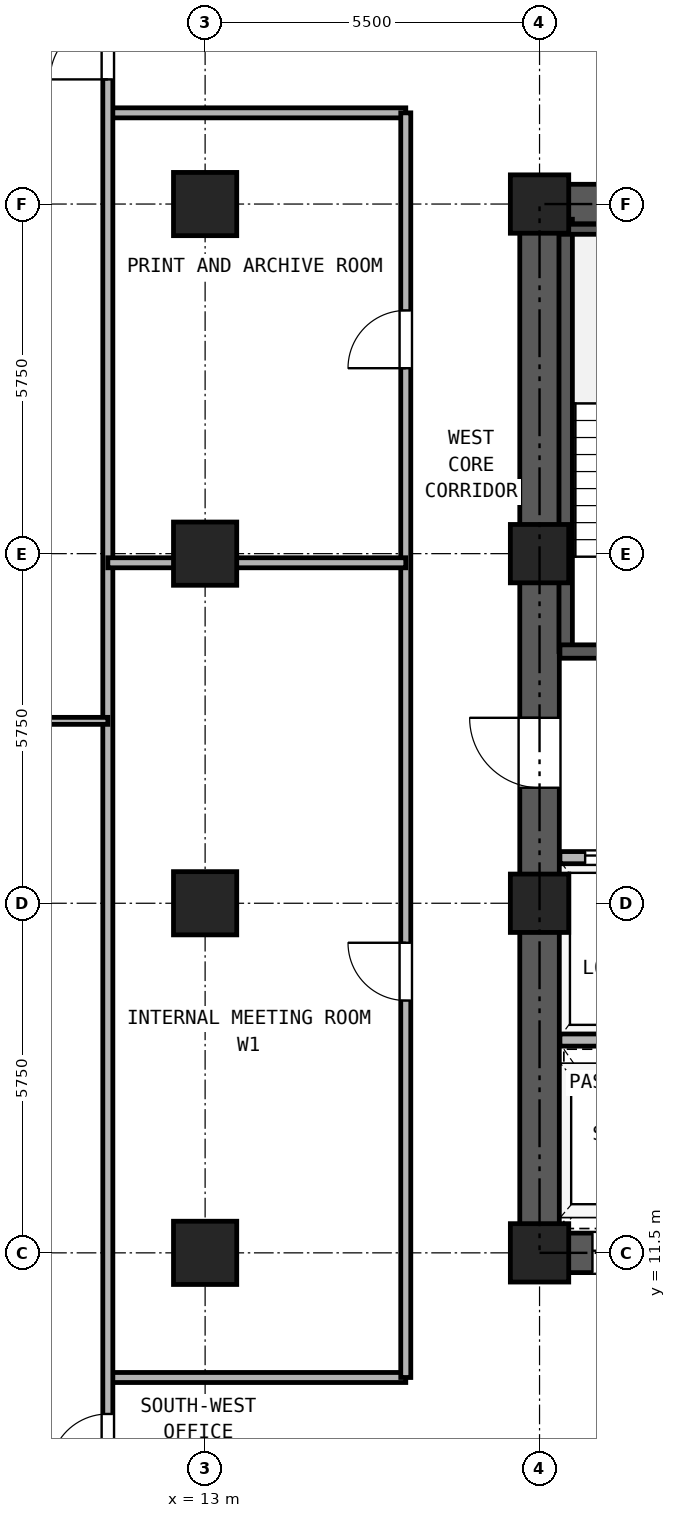
"""IFC4 building model, lengths in metres.
Left out: names, types, materials, properties, quantities, classifications, styles, units other than length and angle.
Written with IfcOpenShell. Run it as: python <this file> out.ifc"""

import sys

from ifc_helpers import new_model, si_unit, direction, frame, frame_2d, origin, origin_2d, place, context, subcontext, project, spatial, rectangle, hollow_rectangle, extrude, source, transform, mapped, element, fill, save


model = new_model("IFC4")
c1 = context("Model", 3, precision=1e-05, world=origin(), true_north=direction((0.0, 1.0)))
c2 = subcontext(c1, "Body", "Model", "MODEL_VIEW")
j1 = project(units=[si_unit("LENGTHUNIT", "METRE"), si_unit("PLANEANGLEUNIT", "RADIAN")], contexts=[c1])
p1 = place(None, origin())
s1 = spatial("IfcSite", under=j1, at=p1, CompositionType="ELEMENT")
p2 = place(p1, origin())
s2 = spatial("IfcBuilding", under=s1, at=p2, CompositionType="ELEMENT")
p3 = place(p2, frame((0.0, 0.0, 29.7)))
s3 = spatial("IfcBuildingStorey", under=s2, at=p3, CompositionType="ELEMENT", Elevation=29.7)
m1 = source(origin(), c2, "Body", "SweptSolid", [
    extrude(hollow_rectangle(XDim=1.04, YDim=1.04, WallThickness=0.065, at=origin_2d()), origin(), (0.0, 0.0, 1.0), 3.32),
])
for number, where, z_axis, x_axis in (
    (1, (13.0, 11.5, 0.0), (0.0, 0.0, 1.0), (1.0, 0.0, 0.0)),
    (2, (13.0, 17.25, 0.0), (0.0, 0.0, 1.0), (1.0, 0.0, 0.0)),
    (3, (13.0, 23.0, 0.0), (0.0, 0.0, 1.0), (1.0, 0.0, 0.0)),
    (4, (13.0, 28.75, 0.0), (0.0, 0.0, 1.0), (1.0, 0.0, 0.0)),
):
    element("IfcColumn", number, at=place(p3, frame(where, z_axis=z_axis, x_axis=x_axis)), inside=s3, PredefinedType="COLUMN", context=c2, shape_type="MappedRepresentation", body=[
        mapped(m1, transform((0.0, 0.0, 0.0), x_axis=(1.0, 0.0, 0.0), y_axis=(0.0, 1.0, 0.0), z_axis=(0.0, 0.0, 1.0), scale=1.0)),
    ])
m2 = source(origin(), c2, "Body", "SweptSolid", [
    extrude(hollow_rectangle(XDim=0.96, YDim=0.96, WallThickness=0.06, at=origin_2d()), origin(), (0.0, 0.0, 1.0), 3.32),
])
for number, where, z_axis, x_axis in (
    (5, (18.5, 11.5, 0.0), (0.0, 0.0, 1.0), (1.0, 0.0, 0.0)),
    (6, (18.5, 17.25, 0.0), (0.0, 0.0, 1.0), (1.0, 0.0, 0.0)),
    (7, (18.5, 23.0, 0.0), (0.0, 0.0, 1.0), (1.0, 0.0, 0.0)),
    (8, (18.5, 28.75, 0.0), (0.0, 0.0, 1.0), (1.0, 0.0, 0.0)),
):
    element("IfcColumn", number, at=place(p3, frame(where, z_axis=z_axis, x_axis=x_axis)), inside=s3, PredefinedType="COLUMN", context=c2, shape_type="MappedRepresentation", body=[
        mapped(m2, transform((0.0, 0.0, 0.0), x_axis=(1.0, 0.0, 0.0), y_axis=(0.0, 1.0, 0.0), z_axis=(0.0, 0.0, 1.0), scale=1.0)),
    ])
p4 = place(p3, frame((18.175, 11.5, 0.0), z_axis=(0.0, 0.0, 1.0), x_axis=(1.0, 0.0, 0.0)))
e9 = element("IfcWall", 9, at=p4, inside=s3, PredefinedType="SHEAR", context=c2, shape_type="SweptSolid", body=[
    extrude(rectangle(XDim=10.65, YDim=0.65, at=frame_2d((5.325, 0.0))), origin(), (0.0, 0.0, 1.0), 3.32),
])
p5 = place(p4, frame((1.195, 0.0, 0.0)))
e10 = element("IfcOpeningElement", 10, at=p5, cuts=e9, PredefinedType="OPENING", context=c2, shape_type="SweptSolid", body=[
    extrude(rectangle(XDim=1.1, YDim=2.25, at=frame_2d((0.55, 1.125))), frame((0.0, 0.335, 0.0), z_axis=(0.0, -1.0, 0.0), x_axis=(1.0, 0.0, 0.0)), (0.0, 0.0, 1.0), 0.67),
])
p6 = place(p4, frame((3.495, 0.0, 0.0)))
e11 = element("IfcOpeningElement", 11, at=p6, cuts=e9, PredefinedType="OPENING", context=c2, shape_type="SweptSolid", body=[
    extrude(rectangle(XDim=1.1, YDim=2.25, at=frame_2d((0.55, 1.125))), frame((0.0, 0.335, 0.0), z_axis=(0.0, -1.0, 0.0), x_axis=(1.0, 0.0, 0.0)), (0.0, 0.0, 1.0), 0.67),
])
p7 = place(p4, frame((5.925, 0.0, 0.0)))
e12 = element("IfcOpeningElement", 12, at=p7, cuts=e9, PredefinedType="OPENING", context=c2, shape_type="SweptSolid", body=[
    extrude(rectangle(XDim=1.1, YDim=2.25, at=frame_2d((0.55, 1.125))), frame((0.0, 0.335, 0.0), z_axis=(0.0, -1.0, 0.0), x_axis=(1.0, 0.0, 0.0)), (0.0, 0.0, 1.0), 0.67),
])
p8 = place(p4, frame((8.325, 0.0, 0.0)))
e13 = element("IfcOpeningElement", 13, at=p8, cuts=e9, PredefinedType="OPENING", context=c2, shape_type="SweptSolid", body=[
    extrude(rectangle(XDim=1.1, YDim=2.25, at=frame_2d((0.55, 1.125))), frame((0.0, 0.335, 0.0), z_axis=(0.0, -1.0, 0.0), x_axis=(1.0, 0.0, 0.0)), (0.0, 0.0, 1.0), 0.67),
])
p9 = place(p3, frame((18.175, 28.75, 0.0), z_axis=(0.0, 0.0, 1.0), x_axis=(1.0, 0.0, 0.0)))
e14 = element("IfcWall", 14, at=p9, inside=s3, PredefinedType="SHEAR", context=c2, shape_type="SweptSolid", body=[
    extrude(rectangle(XDim=10.65, YDim=0.65, at=frame_2d((5.325, 0.0))), origin(), (0.0, 0.0, 1.0), 3.32),
])
p10 = place(p9, frame((4.205, 0.0, 0.0)))
e15 = element("IfcOpeningElement", 15, at=p10, cuts=e14, PredefinedType="OPENING", context=c2, shape_type="SweptSolid", body=[
    extrude(rectangle(XDim=0.9, YDim=2.05, at=frame_2d((0.45, 1.025))), frame((0.0, 0.335, 0.0), z_axis=(0.0, -1.0, 0.0), x_axis=(1.0, 0.0, 0.0)), (0.0, 0.0, 1.0), 0.67),
])
p11 = place(p9, frame((5.745, 0.0, 0.0)))
e16 = element("IfcOpeningElement", 16, at=p11, cuts=e14, PredefinedType="OPENING", context=c2, shape_type="SweptSolid", body=[
    extrude(rectangle(XDim=0.9, YDim=2.05, at=frame_2d((0.45, 1.025))), frame((0.0, 0.335, 0.0), z_axis=(0.0, -1.0, 0.0), x_axis=(1.0, 0.0, 0.0)), (0.0, 0.0, 1.0), 0.67),
])
p12 = place(p3, frame((18.5, 11.825, 0.0), z_axis=(0.0, 0.0, 1.0), x_axis=(0.0, 1.0, 0.0)))
e17 = element("IfcWall", 17, at=p12, inside=s3, PredefinedType="SHEAR", context=c2, shape_type="SweptSolid", body=[
    extrude(rectangle(XDim=16.6, YDim=0.65, at=frame_2d((8.3, 0.0))), origin(), (0.0, 0.0, 1.0), 3.32),
])
p13 = place(p12, frame((7.325, 0.0, 0.0)))
e18 = element("IfcOpeningElement", 18, at=p13, cuts=e17, PredefinedType="OPENING", context=c2, shape_type="SweptSolid", body=[
    extrude(rectangle(XDim=1.15, YDim=2.2, at=frame_2d((0.575, 1.1))), frame((0.0, 0.335, 0.0), z_axis=(0.0, -1.0, 0.0), x_axis=(1.0, 0.0, 0.0)), (0.0, 0.0, 1.0), 0.67),
])
p14 = place(p3, frame((18.93, 21.39, 0.0), z_axis=(0.0, 0.0, 1.0), x_axis=(0.0, 1.0, 0.0)))
e19 = element("IfcWall", 19, at=p14, inside=s3, PredefinedType="SOLIDWALL", context=c2, shape_type="SweptSolid", body=[
    extrude(rectangle(XDim=7.11, YDim=0.22, at=frame_2d((3.555, 0.0))), origin(), (0.0, 0.0, 1.0), 3.32),
])
p15 = place(p3, frame((18.835, 28.335, 0.0), z_axis=(0.0, 0.0, 1.0), x_axis=(1.0, 0.0, 0.0)))
e20 = element("IfcWall", 20, at=p15, inside=s3, PredefinedType="PARTITIONING", context=c2, shape_type="SweptSolid", body=[
    extrude(rectangle(XDim=3.275, YDim=0.165, at=frame_2d((1.638, 0.0))), origin(), (0.0, 0.0, 1.0), 3.32),
])
p16 = place(p3, frame((18.835, 21.39, 0.0), z_axis=(0.0, 0.0, 1.0), x_axis=(1.0, 0.0, 0.0)))
e21 = element("IfcWall", 21, at=p16, inside=s3, PredefinedType="SOLIDWALL", context=c2, shape_type="SweptSolid", body=[
    extrude(rectangle(XDim=6.295, YDim=0.22, at=frame_2d((3.147, 0.0))), origin(), (0.0, 0.0, 1.0), 3.32),
])
p17 = place(p16, frame((1.015, 0.0, 0.0)))
e22 = element("IfcOpeningElement", 22, at=p17, cuts=e21, PredefinedType="OPENING", context=c2, shape_type="SweptSolid", body=[
    extrude(rectangle(XDim=1.15, YDim=2.2, at=frame_2d((0.575, 1.1))), frame((0.0, 0.12, 0.0), z_axis=(0.0, -1.0, 0.0), x_axis=(1.0, 0.0, 0.0)), (0.0, 0.0, 1.0), 0.24),
])
p18 = place(p16, frame((4.745, 0.0, 0.0)))
e23 = element("IfcOpeningElement", 23, at=p18, cuts=e21, PredefinedType="OPENING", context=c2, shape_type="SweptSolid", body=[
    extrude(rectangle(XDim=1.1, YDim=2.25, at=frame_2d((0.55, 1.125))), frame((0.0, 0.12, 0.0), z_axis=(0.0, -1.0, 0.0), x_axis=(1.0, 0.0, 0.0)), (0.0, 0.0, 1.0), 0.24),
])
p19 = place(p3, frame((18.835, 18.0, 0.0), z_axis=(0.0, 0.0, 1.0), x_axis=(1.0, 0.0, 0.0)))
e24 = element("IfcWall", 24, at=p19, inside=s3, PredefinedType="PARTITIONING", context=c2, shape_type="SweptSolid", body=[
    extrude(rectangle(XDim=9.33, YDim=0.2, at=frame_2d((4.665, 0.0))), origin(), (0.0, 0.0, 1.0), 3.32),
])
p20 = place(p19, frame((0.415, 0.0, 0.0)))
e25 = element("IfcOpeningElement", 25, at=p20, cuts=e24, PredefinedType="OPENING", context=c2, shape_type="SweptSolid", body=[
    extrude(rectangle(XDim=1.3, YDim=2.3, at=frame_2d((0.65, 1.15))), frame((0.0, 0.11, 0.0), z_axis=(0.0, -1.0, 0.0), x_axis=(1.0, 0.0, 0.0)), (0.0, 0.0, 1.0), 0.22),
])
p21 = place(p19, frame((2.515, 0.0, 0.0)))
e26 = element("IfcOpeningElement", 26, at=p21, cuts=e24, PredefinedType="OPENING", context=c2, shape_type="SweptSolid", body=[
    extrude(rectangle(XDim=1.3, YDim=2.3, at=frame_2d((0.65, 1.15))), frame((0.0, 0.11, 0.0), z_axis=(0.0, -1.0, 0.0), x_axis=(1.0, 0.0, 0.0)), (0.0, 0.0, 1.0), 0.22),
])
p22 = place(p19, frame((4.915, 0.0, 0.0)))
e27 = element("IfcOpeningElement", 27, at=p22, cuts=e24, PredefinedType="OPENING", context=c2, shape_type="SweptSolid", body=[
    extrude(rectangle(XDim=0.9, YDim=2.05, at=frame_2d((0.45, 1.025))), frame((0.0, 0.11, 0.0), z_axis=(0.0, -1.0, 0.0), x_axis=(1.0, 0.0, 0.0)), (0.0, 0.0, 1.0), 0.22),
])
p23 = place(p19, frame((7.615, 0.0, 0.0)))
e28 = element("IfcOpeningElement", 28, at=p23, cuts=e24, PredefinedType="OPENING", context=c2, shape_type="SweptSolid", body=[
    extrude(rectangle(XDim=0.9, YDim=2.05, at=frame_2d((0.45, 1.025))), frame((0.0, 0.11, 0.0), z_axis=(0.0, -1.0, 0.0), x_axis=(1.0, 0.0, 0.0)), (0.0, 0.0, 1.0), 0.22),
])
p24 = place(p3, frame((18.835, 15.0, 0.0), z_axis=(0.0, 0.0, 1.0), x_axis=(1.0, 0.0, 0.0)))
e29 = element("IfcWall", 29, at=p24, inside=s3, PredefinedType="PARTITIONING", context=c2, shape_type="SweptSolid", body=[
    extrude(rectangle(XDim=9.33, YDim=0.2, at=frame_2d((4.665, 0.0))), origin(), (0.0, 0.0, 1.0), 3.32),
])
for number, where, z_axis, x_axis in (
    (30, (11.4, 9.45, 0.0), (0.0, 0.0, 1.0), (1.0, 0.0, 0.0)),
    (31, (11.4, 30.25, 0.0), (0.0, 0.0, 1.0), (1.0, 0.0, 0.0)),
):
    element("IfcWall", number, at=place(p3, frame(where, z_axis=z_axis, x_axis=x_axis)), inside=s3, PredefinedType="PARTITIONING", context=c2, shape_type="SweptSolid", body=[
        extrude(rectangle(XDim=4.9, YDim=0.165, at=frame_2d((2.45, 0.0))), origin(), (0.0, 0.0, 1.0), 3.32),
    ])
p25 = place(p3, frame((16.3, 9.45, 0.0), z_axis=(0.0, 0.0, 1.0), x_axis=(0.0, 1.0, 0.0)))
e32 = element("IfcWall", 32, at=p25, inside=s3, PredefinedType="PARTITIONING", context=c2, shape_type="SweptSolid", body=[
    extrude(rectangle(XDim=20.8, YDim=0.165, at=frame_2d((10.4, 0.0))), origin(), (0.0, 0.0, 1.0), 3.32),
])
p26 = place(p25, frame((6.2, 0.0, 0.0)))
e33 = element("IfcOpeningElement", 33, at=p26, cuts=e32, PredefinedType="OPENING", context=c2, shape_type="SweptSolid", body=[
    extrude(rectangle(XDim=0.95, YDim=2.15, at=frame_2d((0.475, 1.075))), frame((0.0, 0.093, 0.0), z_axis=(0.0, -1.0, 0.0), x_axis=(1.0, 0.0, 0.0)), (0.0, 0.0, 1.0), 0.185),
])
p27 = place(p25, frame((16.6, 0.0, 0.0)))
e34 = element("IfcOpeningElement", 34, at=p27, cuts=e32, PredefinedType="OPENING", context=c2, shape_type="SweptSolid", body=[
    extrude(rectangle(XDim=0.95, YDim=2.15, at=frame_2d((0.475, 1.075))), frame((0.0, 0.093, 0.0), z_axis=(0.0, -1.0, 0.0), x_axis=(1.0, 0.0, 0.0)), (0.0, 0.0, 1.0), 0.185),
])
p28 = place(p3, frame((11.4, 0.16, 0.0), z_axis=(0.0, 0.0, 1.0), x_axis=(0.0, 1.0, 0.0)))
e35 = element("IfcWall", 35, at=p28, inside=s3, PredefinedType="PARTITIONING", context=c2, shape_type="SweptSolid", body=[
    extrude(rectangle(XDim=40.18, YDim=0.165, at=frame_2d((20.09, 0.0))), origin(), (0.0, 0.0, 1.0), 3.32),
])
p29 = place(p28, frame((7.74, 0.0, 0.0)))
e36 = element("IfcOpeningElement", 36, at=p29, cuts=e35, PredefinedType="OPENING", context=c2, shape_type="SweptSolid", body=[
    extrude(rectangle(XDim=0.95, YDim=2.15, at=frame_2d((0.475, 1.075))), frame((0.0, 0.093, 0.0), z_axis=(0.0, -1.0, 0.0), x_axis=(1.0, 0.0, 0.0)), (0.0, 0.0, 1.0), 0.185),
])
p30 = place(p28, frame((30.64, 0.0, 0.0)))
e37 = element("IfcOpeningElement", 37, at=p30, cuts=e35, PredefinedType="OPENING", context=c2, shape_type="SweptSolid", body=[
    extrude(rectangle(XDim=0.95, YDim=2.15, at=frame_2d((0.475, 1.075))), frame((0.0, 0.093, 0.0), z_axis=(0.0, -1.0, 0.0), x_axis=(1.0, 0.0, 0.0)), (0.0, 0.0, 1.0), 0.185),
])
p31 = place(p3, frame((0.16, 20.25, 0.0), z_axis=(0.0, 0.0, 1.0), x_axis=(1.0, 0.0, 0.0)))
e38 = element("IfcWall", 38, at=p31, inside=s3, PredefinedType="PARTITIONING", context=c2, shape_type="SweptSolid", body=[
    extrude(rectangle(XDim=11.24, YDim=0.115, at=frame_2d((5.62, 0.0))), origin(), (0.0, 0.0, 1.0), 2.898),
])
p32 = place(p3, frame((11.4, 22.85, 0.0), z_axis=(0.0, 0.0, 1.0), x_axis=(1.0, 0.0, 0.0)))
e39 = element("IfcWall", 39, at=p32, inside=s3, PredefinedType="PARTITIONING", context=c2, shape_type="SweptSolid", body=[
    extrude(rectangle(XDim=4.9, YDim=0.165, at=frame_2d((2.45, 0.0))), origin(), (0.0, 0.0, 1.0), 2.539),
])
p33 = place(p20, origin())
e40 = element("IfcDoor", 40, at=p33, inside=s3, OperationType="DOUBLE_DOOR_SLIDING", PredefinedType="DOOR", context=c2, shape_type="SweptSolid", body=[
    extrude(rectangle(XDim=1.3, YDim=2.3, at=frame_2d((0.65, 1.15))), frame((0.0, 0.025, 0.0), z_axis=(0.0, -1.0, 0.0), x_axis=(1.0, 0.0, 0.0)), (0.0, 0.0, 1.0), 0.05),
])
fill(e25, e40)
p34 = place(p13, frame((1.15, 0.0, 0.0), z_axis=(0.0, 0.0, 1.0), x_axis=(-1.0, 0.0, 0.0)))
e41 = element("IfcDoor", 41, at=p34, inside=s3, OperationType="SINGLE_SWING_RIGHT", PredefinedType="DOOR", context=c2, shape_type="SweptSolid", body=[
    extrude(rectangle(XDim=1.15, YDim=2.2, at=frame_2d((0.575, 1.1))), frame((0.0, 0.025, 0.0), z_axis=(0.0, -1.0, 0.0), x_axis=(1.0, 0.0, 0.0)), (0.0, 0.0, 1.0), 0.05),
])
fill(e18, e41)
p35 = place(p5, frame((1.1, 0.0, 0.0), z_axis=(0.0, 0.0, 1.0), x_axis=(-1.0, 0.0, 0.0)))
e42 = element("IfcDoor", 42, at=p35, inside=s3, OperationType="DOUBLE_DOOR_SLIDING", PredefinedType="DOOR", context=c2, shape_type="SweptSolid", body=[
    extrude(rectangle(XDim=1.1, YDim=2.25, at=frame_2d((0.55, 1.125))), frame((0.0, 0.025, 0.0), z_axis=(0.0, -1.0, 0.0), x_axis=(1.0, 0.0, 0.0)), (0.0, 0.0, 1.0), 0.05),
])
fill(e10, e42)
p36 = place(p29, frame((0.95, 0.0, 0.0), z_axis=(0.0, 0.0, 1.0), x_axis=(-1.0, 0.0, 0.0)))
e43 = element("IfcDoor", 43, at=p36, inside=s3, OperationType="SINGLE_SWING_LEFT", PredefinedType="DOOR", context=c2, shape_type="SweptSolid", body=[
    extrude(rectangle(XDim=0.95, YDim=2.15, at=frame_2d((0.475, 1.075))), frame((0.0, 0.025, 0.0), z_axis=(0.0, -1.0, 0.0), x_axis=(1.0, 0.0, 0.0)), (0.0, 0.0, 1.0), 0.05),
])
fill(e36, e43)
p37 = place(p30, frame((0.95, 0.0, 0.0), z_axis=(0.0, 0.0, 1.0), x_axis=(-1.0, 0.0, 0.0)))
e44 = element("IfcDoor", 44, at=p37, inside=s3, OperationType="SINGLE_SWING_LEFT", PredefinedType="DOOR", context=c2, shape_type="SweptSolid", body=[
    extrude(rectangle(XDim=0.95, YDim=2.15, at=frame_2d((0.475, 1.075))), frame((0.0, 0.025, 0.0), z_axis=(0.0, -1.0, 0.0), x_axis=(1.0, 0.0, 0.0)), (0.0, 0.0, 1.0), 0.05),
])
fill(e37, e44)
p38 = place(p26, frame((0.95, 0.0, 0.0), z_axis=(0.0, 0.0, 1.0), x_axis=(-1.0, 0.0, 0.0)))
e45 = element("IfcDoor", 45, at=p38, inside=s3, OperationType="SINGLE_SWING_RIGHT", PredefinedType="DOOR", context=c2, shape_type="SweptSolid", body=[
    extrude(rectangle(XDim=0.95, YDim=2.15, at=frame_2d((0.475, 1.075))), frame((0.0, 0.025, 0.0), z_axis=(0.0, -1.0, 0.0), x_axis=(1.0, 0.0, 0.0)), (0.0, 0.0, 1.0), 0.05),
])
fill(e33, e45)
p39 = place(p27, frame((0.95, 0.0, 0.0), z_axis=(0.0, 0.0, 1.0), x_axis=(-1.0, 0.0, 0.0)))
e46 = element("IfcDoor", 46, at=p39, inside=s3, OperationType="SINGLE_SWING_LEFT", PredefinedType="DOOR", context=c2, shape_type="SweptSolid", body=[
    extrude(rectangle(XDim=0.95, YDim=2.15, at=frame_2d((0.475, 1.075))), frame((0.0, 0.025, 0.0), z_axis=(0.0, -1.0, 0.0), x_axis=(1.0, 0.0, 0.0)), (0.0, 0.0, 1.0), 0.05),
])
fill(e34, e46)
save(model, sys.argv[1])
